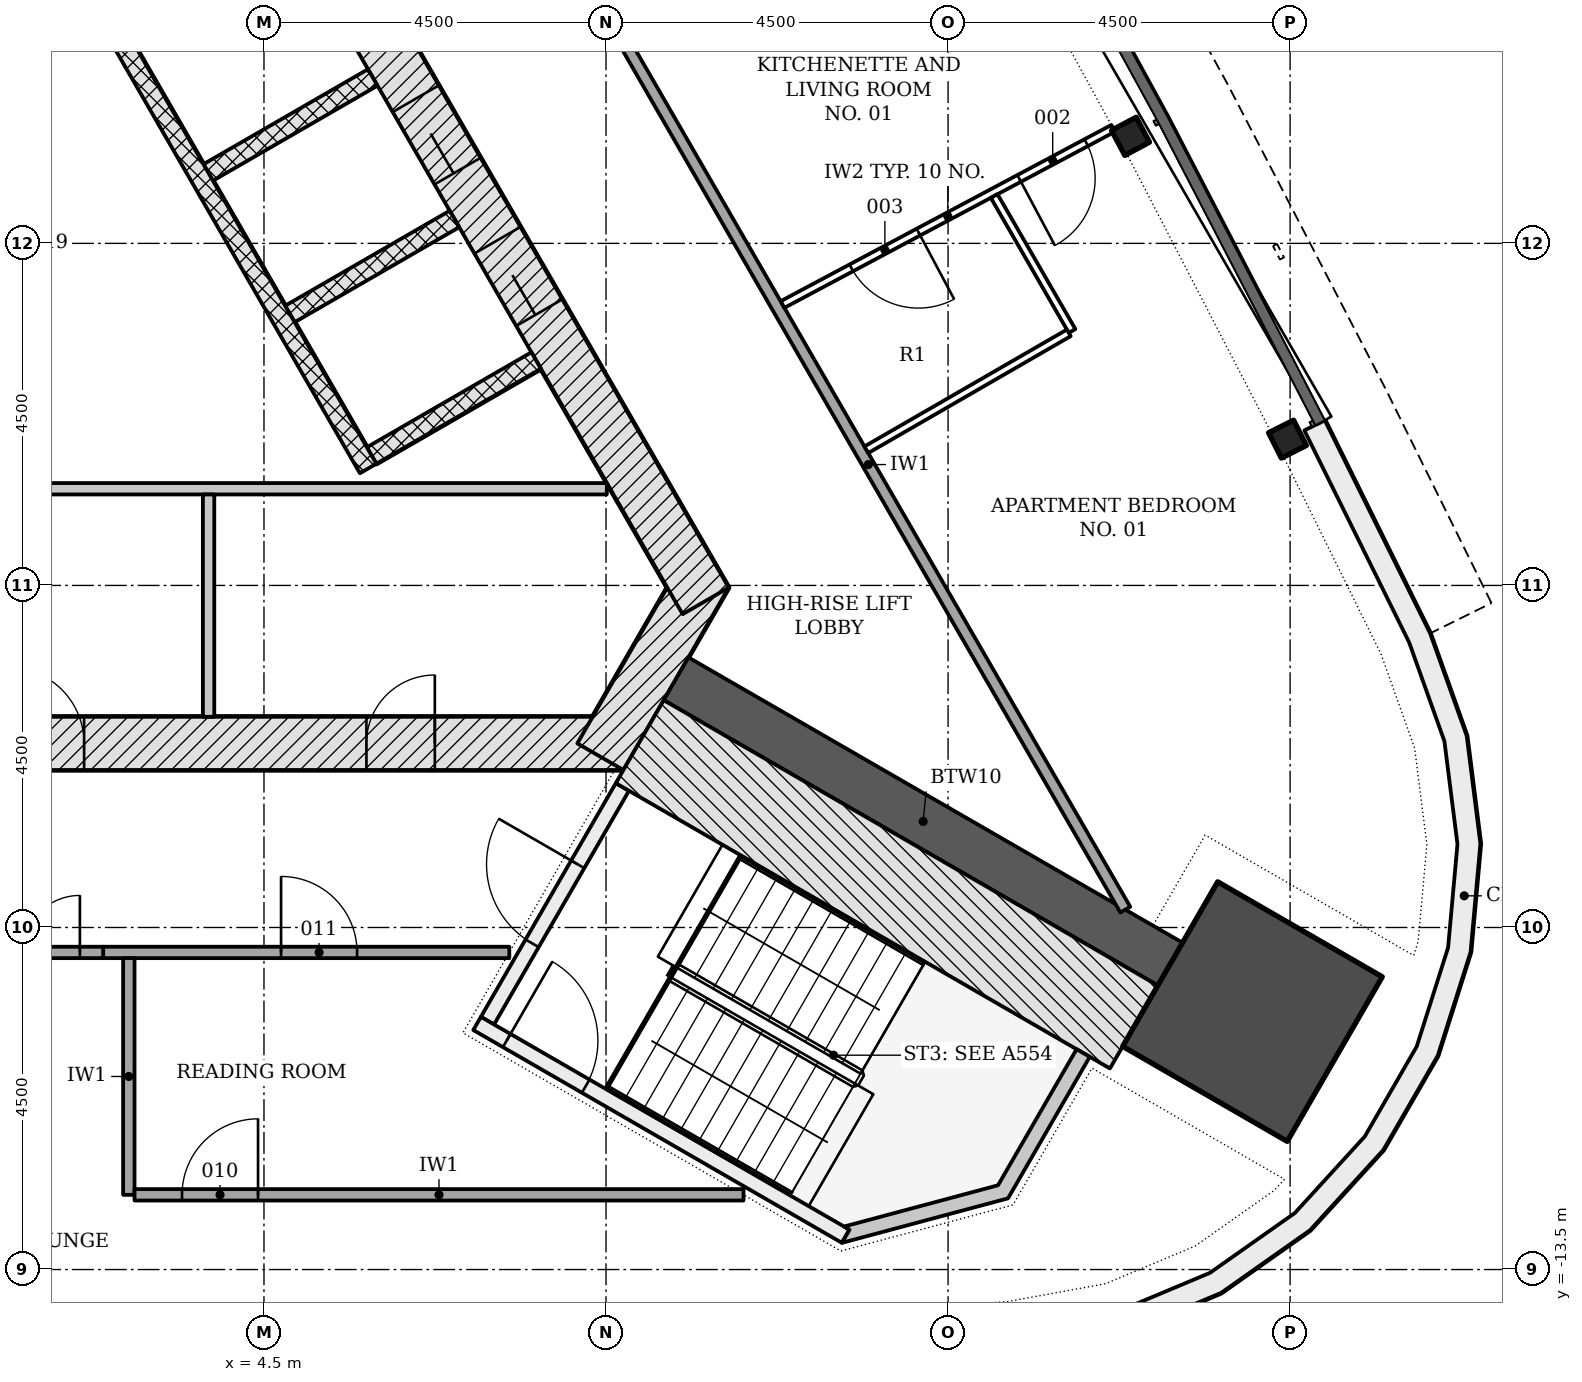
"""IFC4 building model, lengths in metres.
Left out: names, types, materials, properties, quantities, classifications, styles, units other than length and angle.
Written with IfcOpenShell. Run it as: python <this file> out.ifc"""

import sys

from ifc_helpers import new_model, si_unit, direction, frame, frame_2d, origin, origin_2d, place, context, subcontext, project, spatial, polyline, rectangle, i_section, outline, extrude, element, fill, save


model = new_model("IFC4")
c1 = context("Model", 3, precision=1e-05, world=origin(), true_north=direction((0.0, 1.0)))
c2 = subcontext(c1, "Body", "Model", "MODEL_VIEW")
j1 = project(units=[si_unit("LENGTHUNIT", "METRE"), si_unit("PLANEANGLEUNIT", "RADIAN")], contexts=[c1])
p1 = place(None, origin())
s1 = spatial("IfcSite", under=j1, at=p1, CompositionType="ELEMENT")
p2 = place(p1, origin())
s2 = spatial("IfcBuilding", under=s1, at=p2, CompositionType="ELEMENT")
p3 = place(p2, frame((0.0, 0.0, 232.8)))
s3 = spatial("IfcBuildingStorey", under=s2, at=p3, CompositionType="ELEMENT", Elevation=232.8)
p4 = place(p3, frame((-9.229, -6.578, -0.2), z_axis=(0.0, 0.0, 1.0), x_axis=(1.0, 0.0, 0.0)))
e1 = element("IfcWall", 1, at=p4, inside=s3, PredefinedType="SHEAR", context=c2, shape_type="SweptSolid", body=[
    extrude(rectangle(XDim=18.458, YDim=0.7, at=frame_2d((9.229, 0.0))), origin(), (0.0, 0.0, 1.0), 3.6),
])
p5 = place(p4, frame((7.5, 0.0, 0.2)))
e2 = element("IfcOpeningElement", 2, at=p5, cuts=e1, PredefinedType="OPENING", context=c2, shape_type="SweptSolid", body=[
    extrude(rectangle(XDim=1.0, YDim=2.1, at=frame_2d((0.5, 1.05))), frame((0.0, 0.36, 0.0), z_axis=(0.0, -1.0, 0.0), x_axis=(1.0, 0.0, 0.0)), (0.0, 0.0, 1.0), 0.72),
])
p6 = place(p4, frame((3.389, 0.0, 0.2)))
e3 = element("IfcOpeningElement", 3, at=p6, cuts=e1, PredefinedType="OPENING", context=c2, shape_type="SweptSolid", body=[
    extrude(rectangle(XDim=0.9, YDim=2.1, at=frame_2d((0.45, 1.05))), frame((0.0, 0.36, 0.0), z_axis=(0.0, -1.0, 0.0), x_axis=(1.0, 0.0, 0.0)), (0.0, 0.0, 1.0), 0.72),
])
p7 = place(p4, frame((10.363, 0.0, 0.2)))
e4 = element("IfcOpeningElement", 4, at=p7, cuts=e1, PredefinedType="OPENING", context=c2, shape_type="SweptSolid", body=[
    extrude(rectangle(XDim=1.0, YDim=2.1, at=frame_2d((0.5, 1.05))), frame((0.0, 0.36, 0.0), z_axis=(0.0, -1.0, 0.0), x_axis=(1.0, 0.0, 0.0)), (0.0, 0.0, 1.0), 0.72),
])
p8 = place(p4, frame((15.077, 0.0, 0.2)))
e5 = element("IfcOpeningElement", 5, at=p8, cuts=e1, PredefinedType="OPENING", context=c2, shape_type="SweptSolid", body=[
    extrude(rectangle(XDim=0.9, YDim=2.1, at=frame_2d((0.45, 1.05))), frame((0.0, 0.36, 0.0), z_axis=(0.0, -1.0, 0.0), x_axis=(1.0, 0.0, 0.0)), (0.0, 0.0, 1.0), 0.72),
])
p9 = place(p3, frame((8.926, -6.753, -0.2), z_axis=(0.0, 0.0, 1.0), x_axis=(0.500042739161, 0.866000726912, 0.0)))
e6 = element("IfcWall", 6, at=p9, inside=s3, PredefinedType="SHEAR", context=c2, shape_type="SweptSolid", body=[
    extrude(rectangle(XDim=2.771, YDim=0.7, at=frame_2d((1.386, 0.0))), origin(), (0.0, 0.0, 1.0), 3.6),
])
p10 = place(p3, frame((10.311, -4.703, -0.2), z_axis=(0.0, 0.0, 1.0), x_axis=(-0.500001446645, 0.866024568562, 0.0)))
e7 = element("IfcWall", 7, at=p10, inside=s3, PredefinedType="SHEAR", context=c2, shape_type="SweptSolid", body=[
    extrude(rectangle(XDim=18.458, YDim=0.7, at=frame_2d((9.229, 0.0))), origin(), (0.0, 0.0, 1.0), 3.6),
])
p11 = place(p10, frame((4.379, 0.0, 0.2)))
e8 = element("IfcOpeningElement", 8, at=p11, cuts=e7, PredefinedType="OPENING", context=c2, shape_type="SweptSolid", body=[
    extrude(rectangle(XDim=1.1, YDim=2.1, at=frame_2d((0.55, 1.05))), frame((0.0, 0.36, 0.0), z_axis=(0.0, -1.0, 0.0), x_axis=(1.0, 0.0, 0.0)), (0.0, 0.0, 1.0), 0.72),
])
p12 = place(p10, frame((6.529, 0.0, 0.2)))
e9 = element("IfcOpeningElement", 9, at=p12, cuts=e7, PredefinedType="OPENING", context=c2, shape_type="SweptSolid", body=[
    extrude(rectangle(XDim=1.1, YDim=2.1, at=frame_2d((0.55, 1.05))), frame((0.0, 0.36, 0.0), z_axis=(0.0, -1.0, 0.0), x_axis=(1.0, 0.0, 0.0)), (0.0, 0.0, 1.0), 0.72),
])
p13 = place(p10, frame((8.679, 0.0, 0.2)))
e10 = element("IfcOpeningElement", 10, at=p13, cuts=e7, PredefinedType="OPENING", context=c2, shape_type="SweptSolid", body=[
    extrude(rectangle(XDim=1.1, YDim=2.1, at=frame_2d((0.55, 1.05))), frame((0.0, 0.36, 0.0), z_axis=(0.0, -1.0, 0.0), x_axis=(1.0, 0.0, 0.0)), (0.0, 0.0, 1.0), 0.72),
])
p14 = place(p10, frame((10.829, 0.0, 0.2)))
e11 = element("IfcOpeningElement", 11, at=p14, cuts=e7, PredefinedType="OPENING", context=c2, shape_type="SweptSolid", body=[
    extrude(rectangle(XDim=1.1, YDim=2.1, at=frame_2d((0.55, 1.05))), frame((0.0, 0.36, 0.0), z_axis=(0.0, -1.0, 0.0), x_axis=(1.0, 0.0, 0.0)), (0.0, 0.0, 1.0), 0.72),
])
p15 = place(p10, frame((12.979, 0.0, 0.2)))
e12 = element("IfcOpeningElement", 12, at=p15, cuts=e7, PredefinedType="OPENING", context=c2, shape_type="SweptSolid", body=[
    extrude(rectangle(XDim=1.1, YDim=2.1, at=frame_2d((0.55, 1.05))), frame((0.0, 0.36, 0.0), z_axis=(0.0, -1.0, 0.0), x_axis=(1.0, 0.0, 0.0)), (0.0, 0.0, 1.0), 0.72),
])
p16 = place(p3, frame((9.922, -5.728, -0.2), z_axis=(0.0, 0.0, 1.0), x_axis=(0.866026891245, -0.499997423634, 0.0)))
e13 = element("IfcWall", 13, at=p16, inside=s3, PredefinedType="SHEAR", context=c2, shape_type="SweptSolid", body=[
    extrude(rectangle(XDim=7.506, YDim=0.65, at=frame_2d((3.753, 0.0))), origin(), (0.0, 0.0, 1.0), 3.6),
])
p17 = place(p3, frame((17.505, -10.106, -0.2), z_axis=(0.0, 0.0, 1.0), x_axis=(0.866025403784, -0.5, 0.0)))
e14 = element("IfcColumn", 14, at=p17, inside=s3, PredefinedType="COLUMN", context=c2, shape_type="SweptSolid", body=[
    extrude(rectangle(XDim=2.5, YDim=2.5, at=origin_2d()), origin(), (0.0, 0.0, 1.0), 3.6),
])
for number, where, z_axis, x_axis in (
    (15, (17.965, -2.575, -0.2), (0.0, 0.0, 1.0), (-0.45, 0.893, 0.0)),
    (16, (15.9, 1.409, -0.2), (0.0, 0.0, 1.0), (-0.47, 0.883, 0.0)),
):
    element("IfcColumn", number, at=place(p3, frame(where, z_axis=z_axis, x_axis=x_axis)), inside=s3, PredefinedType="COLUMN", context=c2, shape_type="SweptSolid", body=[
        extrude(i_section(OverallWidth=0.373, OverallDepth=0.368, WebThickness=0.015, FlangeThickness=0.024, FilletRadius=0.015, at=origin_2d()), origin(), (0.0, 0.0, 1.0), 3.6),
    ])
p18 = place(p3, origin())
e17 = element("IfcWall", 17, at=p18, inside=s3, PredefinedType="NOTDEFINED", context=c2, shape_type="SweptSolid", body=[
    extrude(outline(polyline([(11.244, -14.82), (14.364, -14.619), (15.772, -14.361), (17.092, -13.808), (18.261, -12.983), (19.227, -11.927), (19.942, -10.687), (20.375, -9.323), (20.504, -7.898), (20.323, -6.478), (19.842, -5.13), (18.457, -2.328), (18.188, -2.46), (19.565, -5.248), (20.03, -6.548), (20.202, -7.903), (20.079, -9.264), (19.666, -10.566), (18.983, -11.748), (18.062, -12.757), (16.945, -13.544), (15.686, -14.072), (14.327, -14.32), (11.225, -14.521), (11.244, -14.82)])), origin(), (0.0, 0.0, 1.0), 3.3),
])
for number, where, z_axis, x_axis in (
    (18, (8.081, -1.541, -0.2), (0.0, 0.0, 1.0), (-0.866, -0.5, 0.0)),
    (19, (7.006, 0.321, -0.2), (0.0, 0.0, 1.0), (-0.866, -0.5, 0.0)),
):
    element("IfcWall", number, at=place(p3, frame(where, z_axis=z_axis, x_axis=x_axis)), inside=s3, PredefinedType="PARTITIONING", context=c2, shape_type="SweptSolid", body=[
        extrude(rectangle(XDim=2.5, YDim=0.25, at=frame_2d((1.25, 0.0))), origin(), (0.0, 0.0, 1.0), 3.6),
    ])
p19 = place(p3, frame((5.931, 2.183, -0.2), z_axis=(0.0, 0.0, 1.0), x_axis=(-0.866047370643, -0.499961950354, 0.0)))
e20 = element("IfcWall", 20, at=p19, inside=s3, PredefinedType="PARTITIONING", context=c2, shape_type="SweptSolid", body=[
    extrude(rectangle(XDim=2.5, YDim=0.25, at=frame_2d((1.25, 0.0))), origin(), (0.0, 0.0, 1.0), 3.6),
])
p20 = place(p3, frame((5.87, -2.961, 0.0), z_axis=(0.0, 0.0, 1.0), x_axis=(-0.50000615651, 0.866021849293, 0.0)))
e21 = element("IfcWall", 21, at=p20, inside=s3, PredefinedType="PARTITIONING", context=c2, shape_type="SweptSolid", body=[
    extrude(rectangle(XDim=11.0, YDim=0.25, at=frame_2d((5.5, 0.0))), origin(), (0.0, 0.0, 1.0), 3.4),
])
p21 = place(p3, frame((-0.129, -3.228, 0.0), z_axis=(0.0, 0.0, 1.0), x_axis=(1.0, 0.0, 0.0)))
e22 = element("IfcWall", 22, at=p21, inside=s3, PredefinedType="PARTITIONING", context=c2, shape_type="SweptSolid", body=[
    extrude(rectangle(XDim=9.139, YDim=0.15, at=frame_2d((4.57, 0.0))), origin(), (0.0, 0.0, 1.0), 3.4),
])
p22 = place(p3, frame((3.771, -3.303, 0.0), z_axis=(0.0, 0.0, 1.0), x_axis=(0.0, -1.0, 0.0)))
e23 = element("IfcWall", 23, at=p22, inside=s3, PredefinedType="PARTITIONING", context=c2, shape_type="SweptSolid", body=[
    extrude(rectangle(XDim=2.925, YDim=0.15, at=frame_2d((1.462, 0.0))), origin(), (0.0, 0.0, 1.0), 3.4),
])
p23 = place(p3, frame((7.44, -10.226, -0.2), z_axis=(0.0, 0.0, 1.0), x_axis=(0.500022077904, 0.866012656725, 0.0)))
e24 = element("IfcWall", 24, at=p23, inside=s3, PredefinedType="SHEAR", context=c2, shape_type="SweptSolid", body=[
    extrude(rectangle(XDim=3.55, YDim=0.2, at=frame_2d((1.775, 0.0))), origin(), (0.0, 0.0, 1.0), 3.6),
])
p24 = place(p23, frame((1.175, 0.0, 0.2)))
e25 = element("IfcOpeningElement", 25, at=p24, cuts=e24, PredefinedType="OPENING", context=c2, shape_type="SweptSolid", body=[
    extrude(rectangle(XDim=1.2, YDim=2.1, at=frame_2d((0.6, 1.05))), frame((0.0, 0.11, 0.0), z_axis=(0.0, -1.0, 0.0), x_axis=(1.0, 0.0, 0.0)), (0.0, 0.0, 1.0), 0.22),
])
p25 = place(p3, frame((7.304, -10.262, -0.2), z_axis=(0.0, 0.0, 1.0), x_axis=(0.866026594901, -0.49999793692, 0.0)))
e26 = element("IfcWall", 26, at=p25, inside=s3, PredefinedType="SHEAR", context=c2, shape_type="SweptSolid", body=[
    extrude(rectangle(XDim=5.6, YDim=0.2, at=frame_2d((2.8, 0.0))), origin(), (0.0, 0.0, 1.0), 3.6),
])
p26 = place(p25, frame((0.45, 0.0, 0.2)))
e27 = element("IfcOpeningElement", 27, at=p26, cuts=e26, PredefinedType="OPENING", context=c2, shape_type="SweptSolid", body=[
    extrude(rectangle(XDim=1.2, YDim=2.1, at=frame_2d((0.6, 1.05))), frame((0.0, 0.11, 0.0), z_axis=(0.0, -1.0, 0.0), x_axis=(1.0, 0.0, 0.0)), (0.0, 0.0, 1.0), 0.22),
])
p27 = place(p3, frame((9.444, -6.555, -0.2), z_axis=(0.0, 0.0, 1.0), x_axis=(0.866020939036, -0.500007733091, 0.0)))
e28 = element("IfcWall", 28, at=p27, inside=s3, PredefinedType="SHEAR", context=c2, shape_type="SweptSolid", body=[
    extrude(rectangle(XDim=7.507, YDim=1.261, at=frame_2d((3.753, 0.0))), origin(), (0.0, 0.0, 1.0), 3.6),
])
p28 = place(p3, frame((0.0, 0.0, -0.2)))
e29 = element("IfcWall", 29, at=p28, inside=s3, PredefinedType="SHEAR", context=c2, shape_type="SweptSolid", body=[
    extrude(outline(polyline([(12.104, -13.149), (14.289, -12.563), (15.364, -10.701), (15.191, -10.601), (14.157, -12.392), (12.132, -12.934), (12.204, -12.976), (12.204, -12.976), (12.204, -12.976), (12.204, -12.976), (12.204, -12.976), (12.204, -12.976), (12.204, -12.976), (12.204, -12.976), (12.204, -12.976), (12.204, -12.976), (12.204, -12.976), (12.204, -12.976), (12.204, -12.976), (12.204, -12.976), (12.204, -12.976), (12.204, -12.976), (12.204, -12.976), (12.104, -13.149)])), origin(), (0.0, 0.0, 1.0), 3.6),
])
p29 = place(p3, frame((15.832, -8.765, 0.0), z_axis=(0.0, 0.0, 1.0), x_axis=(-0.500008967739, 0.866020226196, 0.0)))
e30 = element("IfcWall", 30, at=p29, inside=s3, PredefinedType="PARTITIONING", context=c2, shape_type="SweptSolid", body=[
    extrude(rectangle(XDim=13.523, YDim=0.15, at=frame_2d((6.761, 0.0))), origin(), (0.0, 0.0, 1.0), 2.852),
])
p30 = place(p3, frame((15.672, 1.514, 0.0), z_axis=(0.0, 0.0, 1.0), x_axis=(-0.882503735513, -0.47030538675, 0.0)))
e31 = element("IfcWall", 31, at=p30, inside=s3, PredefinedType="PARTITIONING", context=c2, shape_type="SweptSolid", body=[
    extrude(rectangle(XDim=4.928, YDim=0.1, at=frame_2d((2.464, 0.0))), origin(), (0.0, 0.0, 1.0), 3.4),
])
p31 = place(p30, frame((0.401, 0.0, 0.0)))
e32 = element("IfcOpeningElement", 32, at=p31, cuts=e31, PredefinedType="OPENING", context=c2, shape_type="SweptSolid", body=[
    extrude(rectangle(XDim=1.0, YDim=2.1, at=frame_2d((0.5, 1.05))), frame((0.0, 0.06, 0.0), z_axis=(0.0, -1.0, 0.0), x_axis=(1.0, 0.0, 0.0)), (0.0, 0.0, 1.0), 0.12),
])
p32 = place(p30, frame((2.903, 0.0, 0.0)))
e33 = element("IfcOpeningElement", 33, at=p32, cuts=e31, PredefinedType="OPENING", context=c2, shape_type="SweptSolid", body=[
    extrude(rectangle(XDim=1.0, YDim=2.1, at=frame_2d((0.5, 1.05))), frame((0.0, 0.06, 0.0), z_axis=(0.0, -1.0, 0.0), x_axis=(1.0, 0.0, 0.0)), (0.0, 0.0, 1.0), 0.12),
])
p33 = place(p3, frame((14.107, 0.623, 0.0), z_axis=(0.0, 0.0, 1.0), x_axis=(0.499956128963, -0.866050731258, 0.0)))
e34 = element("IfcWall", 34, at=p33, inside=s3, PredefinedType="PARTITIONING", context=c2, shape_type="SweptSolid", body=[
    extrude(rectangle(XDim=2.05, YDim=0.1, at=frame_2d((1.025, 0.0))), origin(), (0.0, 0.0, 1.0), 2.852),
])
p34 = place(p3, frame((15.088, -1.177, 0.0), z_axis=(0.0, 0.0, 1.0), x_axis=(-0.866016353143, -0.500015675843, 0.0)))
e35 = element("IfcWall", 35, at=p34, inside=s3, PredefinedType="PARTITIONING", context=c2, shape_type="SweptSolid", body=[
    extrude(rectangle(XDim=3.075, YDim=0.1, at=frame_2d((1.538, 0.0))), origin(), (0.0, 0.0, 1.0), 3.4),
])
p35 = place(p3, frame((2.384, -9.328, 0.0), z_axis=(0.0, 0.0, 1.0), x_axis=(1.0, 0.0, 0.0)))
e36 = element("IfcWall", 36, at=p35, inside=s3, PredefinedType="PARTITIONING", context=c2, shape_type="SweptSolid", body=[
    extrude(rectangle(XDim=5.343, YDim=0.15, at=frame_2d((2.672, 0.0))), origin(), (0.0, 0.0, 1.0), 2.852),
])
p36 = place(p35, frame((2.341, 0.0, 0.0)))
e37 = element("IfcOpeningElement", 37, at=p36, cuts=e36, PredefinedType="OPENING", context=c2, shape_type="SweptSolid", body=[
    extrude(rectangle(XDim=1.0, YDim=2.1, at=frame_2d((0.5, 1.05))), frame((0.0, 0.085, 0.0), z_axis=(0.0, -1.0, 0.0), x_axis=(1.0, 0.0, 0.0)), (0.0, 0.0, 1.0), 0.17),
])
p37 = place(p3, frame((-1.984, -9.328, 0.0), z_axis=(0.0, 0.0, 1.0), x_axis=(1.0, 0.0, 0.0)))
e38 = element("IfcWall", 38, at=p37, inside=s3, PredefinedType="PARTITIONING", context=c2, shape_type="SweptSolid", body=[
    extrude(rectangle(XDim=4.369, YDim=0.15, at=frame_2d((2.184, 0.0))), origin(), (0.0, 0.0, 1.0), 2.852),
])
p38 = place(p37, frame((2.562, 0.0, 0.0)))
e39 = element("IfcOpeningElement", 39, at=p38, cuts=e38, PredefinedType="OPENING", context=c2, shape_type="SweptSolid", body=[
    extrude(rectangle(XDim=1.5, YDim=2.1, at=frame_2d((0.75, 1.05))), frame((0.0, 0.085, 0.0), z_axis=(0.0, -1.0, 0.0), x_axis=(1.0, 0.0, 0.0)), (0.0, 0.0, 1.0), 0.17),
])
p39 = place(p3, frame((2.722, -9.403, 0.0), z_axis=(0.0, 0.0, 1.0), x_axis=(0.0, -1.0, 0.0)))
e40 = element("IfcWall", 40, at=p39, inside=s3, PredefinedType="PARTITIONING", context=c2, shape_type="SweptSolid", body=[
    extrude(rectangle(XDim=3.114, YDim=0.15, at=frame_2d((1.557, 0.0))), origin(), (0.0, 0.0, 1.0), 3.4),
])
p40 = place(p3, frame((2.797, -12.517, 0.0), z_axis=(0.0, 0.0, 1.0), x_axis=(1.0, 0.0, 0.0)))
e41 = element("IfcWall", 41, at=p40, inside=s3, PredefinedType="PARTITIONING", context=c2, shape_type="SweptSolid", body=[
    extrude(rectangle(XDim=8.012, YDim=0.15, at=frame_2d((4.006, 0.0))), origin(), (0.0, 0.0, 1.0), 2.852),
])
p41 = place(p40, frame((0.625, 0.0, 0.0)))
e42 = element("IfcOpeningElement", 42, at=p41, cuts=e41, PredefinedType="OPENING", context=c2, shape_type="SweptSolid", body=[
    extrude(rectangle(XDim=1.0, YDim=2.1, at=frame_2d((0.5, 1.05))), frame((0.0, 0.085, 0.0), z_axis=(0.0, -1.0, 0.0), x_axis=(1.0, 0.0, 0.0)), (0.0, 0.0, 1.0), 0.17),
])
p42 = place(p11, origin())
e43 = element("IfcDoor", 43, at=p42, inside=s3, OperationType="DOUBLE_DOOR_SLIDING", PredefinedType="DOOR", context=c2, shape_type="SweptSolid", body=[
    extrude(rectangle(XDim=1.1, YDim=2.1, at=frame_2d((0.55, 1.05))), frame((0.0, 0.025, 0.0), z_axis=(0.0, -1.0, 0.0), x_axis=(1.0, 0.0, 0.0)), (0.0, 0.0, 1.0), 0.05),
])
fill(e8, e43)
p43 = place(p12, origin())
e44 = element("IfcDoor", 44, at=p43, inside=s3, OperationType="DOUBLE_DOOR_SLIDING", PredefinedType="DOOR", context=c2, shape_type="SweptSolid", body=[
    extrude(rectangle(XDim=1.1, YDim=2.1, at=frame_2d((0.55, 1.05))), frame((0.0, 0.025, 0.0), z_axis=(0.0, -1.0, 0.0), x_axis=(1.0, 0.0, 0.0)), (0.0, 0.0, 1.0), 0.05),
])
fill(e9, e44)
p44 = place(p7, origin())
e45 = element("IfcDoor", 45, at=p44, inside=s3, OperationType="SINGLE_SWING_LEFT", PredefinedType="DOOR", context=c2, shape_type="SweptSolid", body=[
    extrude(rectangle(XDim=1.0, YDim=2.1, at=frame_2d((0.5, 1.05))), frame((0.0, 0.075, 0.0), z_axis=(0.0, -1.0, 0.0), x_axis=(1.0, 0.0, 0.0)), (0.0, 0.0, 1.0), 0.15),
])
fill(e4, e45)
p45 = place(p8, origin())
e46 = element("IfcDoor", 46, at=p45, inside=s3, OperationType="SINGLE_SWING_RIGHT", PredefinedType="DOOR", context=c2, shape_type="SweptSolid", body=[
    extrude(rectangle(XDim=0.9, YDim=2.1, at=frame_2d((0.45, 1.05))), frame((0.0, 0.075, 0.0), z_axis=(0.0, -1.0, 0.0), x_axis=(1.0, 0.0, 0.0)), (0.0, 0.0, 1.0), 0.15),
])
fill(e5, e46)
p46 = place(p24, origin())
e47 = element("IfcDoor", 47, at=p46, inside=s3, OperationType="SINGLE_SWING_RIGHT", PredefinedType="DOOR", context=c2, shape_type="SweptSolid", body=[
    extrude(rectangle(XDim=1.2, YDim=2.1, at=frame_2d((0.6, 1.05))), frame((0.0, 0.025, 0.0), z_axis=(0.0, -1.0, 0.0), x_axis=(1.0, 0.0, 0.0)), (0.0, 0.0, 1.0), 0.05),
])
fill(e25, e47)
p47 = place(p26, origin())
e48 = element("IfcDoor", 48, at=p47, inside=s3, OperationType="SINGLE_SWING_LEFT", PredefinedType="DOOR", context=c2, shape_type="SweptSolid", body=[
    extrude(rectangle(XDim=1.2, YDim=2.1, at=frame_2d((0.6, 1.05))), frame((0.0, 0.025, 0.0), z_axis=(0.0, -1.0, 0.0), x_axis=(1.0, 0.0, 0.0)), (0.0, 0.0, 1.0), 0.05),
])
fill(e27, e48)
p48 = place(p31, origin())
e49 = element("IfcDoor", 49, at=p48, inside=s3, OperationType="SINGLE_SWING_RIGHT", PredefinedType="DOOR", context=c2, shape_type="SweptSolid", body=[
    extrude(rectangle(XDim=1.0, YDim=2.1, at=frame_2d((0.5, 1.05))), frame((0.0, 0.025, 0.0), z_axis=(0.0, -1.0, 0.0), x_axis=(1.0, 0.0, 0.0)), (0.0, 0.0, 1.0), 0.05),
])
fill(e32, e49)
p49 = place(p32, origin())
e50 = element("IfcDoor", 50, at=p49, inside=s3, OperationType="SINGLE_SWING_LEFT", PredefinedType="DOOR", context=c2, shape_type="SweptSolid", body=[
    extrude(rectangle(XDim=1.0, YDim=2.1, at=frame_2d((0.5, 1.05))), frame((0.0, 0.025, 0.0), z_axis=(0.0, -1.0, 0.0), x_axis=(1.0, 0.0, 0.0)), (0.0, 0.0, 1.0), 0.05),
])
fill(e33, e50)
p50 = place(p38, origin())
e51 = element("IfcDoor", 51, at=p50, inside=s3, OperationType="DOUBLE_DOOR_SINGLE_SWING", PredefinedType="DOOR", context=c2, shape_type="SweptSolid", body=[
    extrude(rectangle(XDim=1.5, YDim=2.1, at=frame_2d((0.75, 1.05))), frame((0.0, 0.025, 0.0), z_axis=(0.0, -1.0, 0.0), x_axis=(1.0, 0.0, 0.0)), (0.0, 0.0, 1.0), 0.05),
])
fill(e39, e51)
p51 = place(p41, origin())
e52 = element("IfcDoor", 52, at=p51, inside=s3, OperationType="SINGLE_SWING_RIGHT", PredefinedType="DOOR", context=c2, shape_type="SweptSolid", body=[
    extrude(rectangle(XDim=1.0, YDim=2.1, at=frame_2d((0.5, 1.05))), frame((0.0, 0.025, 0.0), z_axis=(0.0, -1.0, 0.0), x_axis=(1.0, 0.0, 0.0)), (0.0, 0.0, 1.0), 0.05),
])
fill(e42, e52)
p52 = place(p36, origin())
e53 = element("IfcDoor", 53, at=p52, inside=s3, OperationType="SINGLE_SWING_LEFT", PredefinedType="DOOR", context=c2, shape_type="SweptSolid", body=[
    extrude(rectangle(XDim=1.0, YDim=2.1, at=frame_2d((0.5, 1.05))), frame((0.0, 0.025, 0.0), z_axis=(0.0, -1.0, 0.0), x_axis=(1.0, 0.0, 0.0)), (0.0, 0.0, 1.0), 0.05),
])
fill(e37, e53)
save(model, sys.argv[1])
